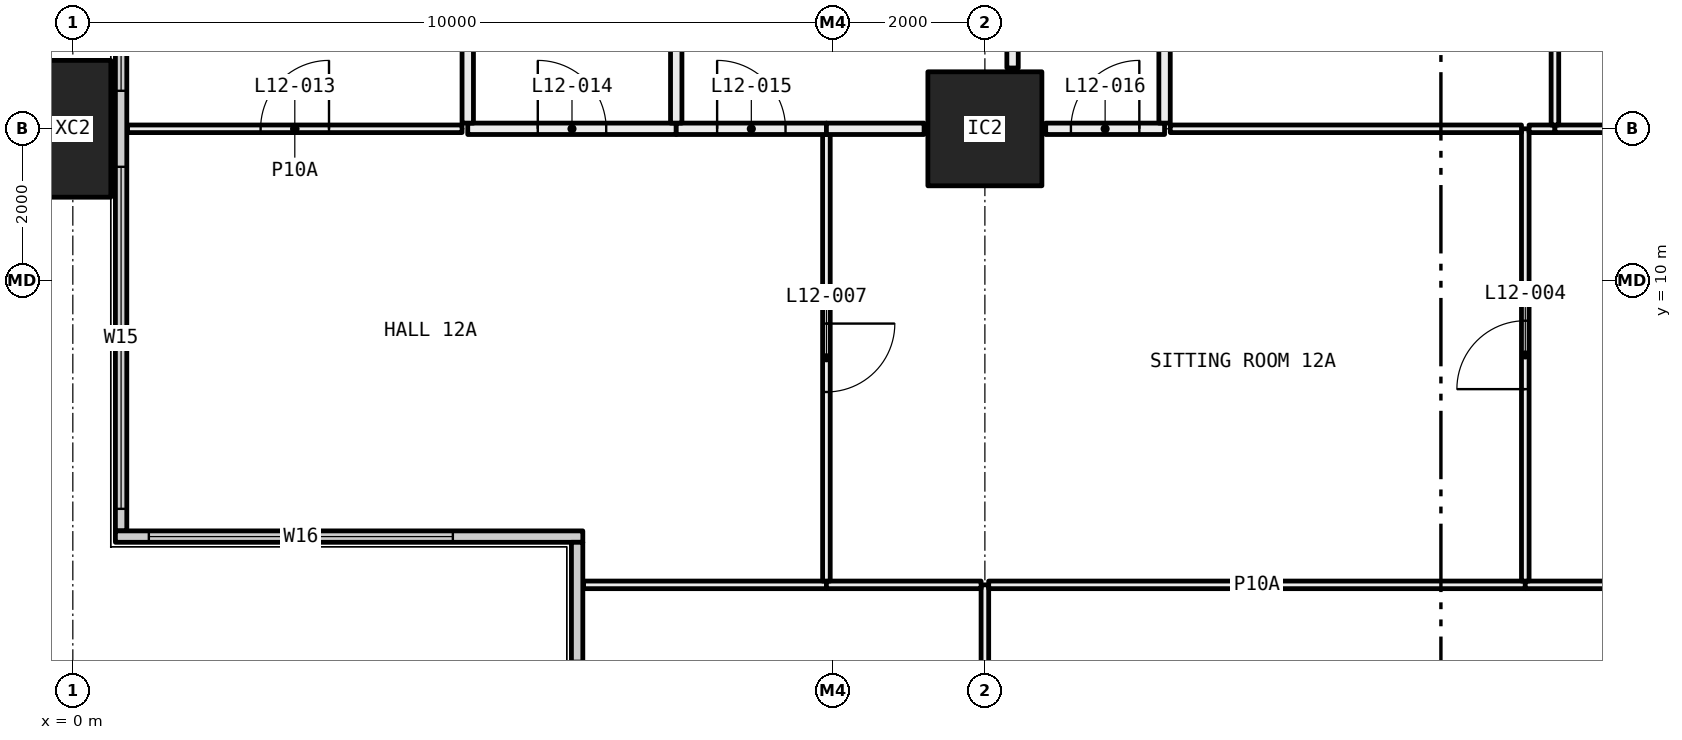
"""IFC4 building model, lengths in metres.
Left out: names, types, materials, properties, quantities, classifications, styles, units other than length and angle.
Written with IfcOpenShell. Run it as: python <this file> out.ifc"""

import sys

from ifc_helpers import new_model, si_unit, direction, frame, frame_2d, origin, origin_2d, place, context, subcontext, project, spatial, rectangle, hollow_rectangle, extrude, element, fill, save


model = new_model("IFC4")
c1 = context("Model", 3, precision=1e-05, world=origin(), true_north=direction((0.0, 1.0)))
c2 = subcontext(c1, "Body", "Model", "MODEL_VIEW")
j1 = project(units=[si_unit("LENGTHUNIT", "METRE"), si_unit("PLANEANGLEUNIT", "RADIAN")], contexts=[c1])
p1 = place(None, origin())
s1 = spatial("IfcSite", under=j1, at=p1, CompositionType="ELEMENT")
p2 = place(p1, origin())
s2 = spatial("IfcBuilding", under=s1, at=p2, CompositionType="ELEMENT")
p3 = place(p2, frame((0.0, 0.0, 54.15)))
s3 = spatial("IfcBuildingStorey", under=s2, at=p3, CompositionType="ELEMENT", Elevation=54.15)
p4 = place(p3, frame((0.0, 12.0, -0.4), z_axis=(0.0, 0.0, 1.0), x_axis=(0.0, 1.0, 0.0)))
e1 = element("IfcColumn", 1, at=p4, inside=s3, PredefinedType="COLUMN", context=c2, shape_type="SweptSolid", body=[
    extrude(hollow_rectangle(XDim=1.8, YDim=1.0, WallThickness=0.07, at=origin_2d()), origin(), (0.0, 0.0, 1.0), 3.45),
])
p5 = place(p3, frame((12.0, 12.0, 0.0), z_axis=(0.0, 0.0, 1.0), x_axis=(1.0, 0.0, 0.0)))
e2 = element("IfcColumn", 2, at=p5, inside=s3, PredefinedType="COLUMN", context=c2, shape_type="SweptSolid", body=[
    extrude(hollow_rectangle(XDim=1.5, YDim=1.5, WallThickness=0.065, at=origin_2d()), origin(), (0.0, 0.0, 1.0), 3.05),
])
p6 = place(p3, frame((0.635, 6.71, 0.0), z_axis=(0.0, 0.0, 1.0), x_axis=(0.0, 1.0, 0.0)))
e3 = element("IfcWall", 3, at=p6, inside=s3, PredefinedType="ELEMENTEDWALL", context=c2, shape_type="SweptSolid", body=[
    extrude(rectangle(XDim=34.58, YDim=0.15, at=frame_2d((17.29, 0.0))), origin(), (0.0, 0.0, 1.0), 3.05),
])
p7 = place(p6, frame((0.29, 0.0, 0.45)))
e4 = element("IfcOpeningElement", 4, at=p7, cuts=e3, PredefinedType="OPENING", context=c2, shape_type="SweptSolid", body=[
    extrude(rectangle(XDim=4.5, YDim=2.55, at=frame_2d((2.25, 1.275))), frame((0.0, 0.085, 0.0), z_axis=(0.0, -1.0, 0.0), x_axis=(1.0, 0.0, 0.0)), (0.0, 0.0, 1.0), 0.17),
])
p8 = place(p6, frame((5.79, 0.0, 0.45)))
e5 = element("IfcOpeningElement", 5, at=p8, cuts=e3, PredefinedType="OPENING", context=c2, shape_type="SweptSolid", body=[
    extrude(rectangle(XDim=1.25, YDim=2.55, at=frame_2d((0.625, 1.275))), frame((0.0, 0.085, 0.0), z_axis=(0.0, -1.0, 0.0), x_axis=(1.0, 0.0, 0.0)), (0.0, 0.0, 1.0), 0.17),
])
p9 = place(p6, frame((9.79, 0.0, 0.45)))
e6 = element("IfcOpeningElement", 6, at=p9, cuts=e3, PredefinedType="OPENING", context=c2, shape_type="SweptSolid", body=[
    extrude(rectangle(XDim=1.0, YDim=2.55, at=frame_2d((0.5, 1.275))), frame((0.0, 0.085, 0.0), z_axis=(0.0, -1.0, 0.0), x_axis=(1.0, 0.0, 0.0)), (0.0, 0.0, 1.0), 0.17),
])
p10 = place(p6, frame((11.79, 0.0, 0.45)))
e7 = element("IfcOpeningElement", 7, at=p10, cuts=e3, PredefinedType="OPENING", context=c2, shape_type="SweptSolid", body=[
    extrude(rectangle(XDim=1.0, YDim=2.55, at=frame_2d((0.5, 1.275))), frame((0.0, 0.085, 0.0), z_axis=(0.0, -1.0, 0.0), x_axis=(1.0, 0.0, 0.0)), (0.0, 0.0, 1.0), 0.17),
])
p11 = place(p6, frame((15.54, 0.0, 0.45)))
e8 = element("IfcOpeningElement", 8, at=p11, cuts=e3, PredefinedType="OPENING", context=c2, shape_type="SweptSolid", body=[
    extrude(rectangle(XDim=1.25, YDim=2.55, at=frame_2d((0.625, 1.275))), frame((0.0, 0.085, 0.0), z_axis=(0.0, -1.0, 0.0), x_axis=(1.0, 0.0, 0.0)), (0.0, 0.0, 1.0), 0.17),
])
p12 = place(p6, frame((17.79, 0.0, 0.45)))
e9 = element("IfcOpeningElement", 9, at=p12, cuts=e3, PredefinedType="OPENING", context=c2, shape_type="SweptSolid", body=[
    extrude(rectangle(XDim=1.25, YDim=2.55, at=frame_2d((0.625, 1.275))), frame((0.0, 0.085, 0.0), z_axis=(0.0, -1.0, 0.0), x_axis=(1.0, 0.0, 0.0)), (0.0, 0.0, 1.0), 0.17),
])
p13 = place(p6, frame((21.79, 0.0, 0.45)))
e10 = element("IfcOpeningElement", 10, at=p13, cuts=e3, PredefinedType="OPENING", context=c2, shape_type="SweptSolid", body=[
    extrude(rectangle(XDim=1.0, YDim=2.55, at=frame_2d((0.5, 1.275))), frame((0.0, 0.085, 0.0), z_axis=(0.0, -1.0, 0.0), x_axis=(1.0, 0.0, 0.0)), (0.0, 0.0, 1.0), 0.17),
])
p14 = place(p6, frame((23.79, 0.0, 0.45)))
e11 = element("IfcOpeningElement", 11, at=p14, cuts=e3, PredefinedType="OPENING", context=c2, shape_type="SweptSolid", body=[
    extrude(rectangle(XDim=1.0, YDim=2.55, at=frame_2d((0.5, 1.275))), frame((0.0, 0.085, 0.0), z_axis=(0.0, -1.0, 0.0), x_axis=(1.0, 0.0, 0.0)), (0.0, 0.0, 1.0), 0.17),
])
p15 = place(p6, frame((27.54, 0.0, 0.45)))
e12 = element("IfcOpeningElement", 12, at=p15, cuts=e3, PredefinedType="OPENING", context=c2, shape_type="SweptSolid", body=[
    extrude(rectangle(XDim=1.25, YDim=2.55, at=frame_2d((0.625, 1.275))), frame((0.0, 0.085, 0.0), z_axis=(0.0, -1.0, 0.0), x_axis=(1.0, 0.0, 0.0)), (0.0, 0.0, 1.0), 0.17),
])
p16 = place(p6, frame((29.79, 0.0, 0.45)))
e13 = element("IfcOpeningElement", 13, at=p16, cuts=e3, PredefinedType="OPENING", context=c2, shape_type="SweptSolid", body=[
    extrude(rectangle(XDim=4.5, YDim=2.55, at=frame_2d((2.25, 1.275))), frame((0.0, 0.085, 0.0), z_axis=(0.0, -1.0, 0.0), x_axis=(1.0, 0.0, 0.0)), (0.0, 0.0, 1.0), 0.17),
])
p17 = place(p3, frame((0.56, 6.635, 0.0), z_axis=(0.0, 0.0, 1.0), x_axis=(1.0, 0.0, 0.0)))
e14 = element("IfcWall", 14, at=p17, inside=s3, PredefinedType="ELEMENTEDWALL", context=c2, shape_type="SweptSolid", body=[
    extrude(rectangle(XDim=6.15, YDim=0.15, at=frame_2d((3.075, 0.0))), origin(), (0.0, 0.0, 1.0), 3.05),
])
p18 = place(p17, frame((0.44, 0.0, 0.45)))
e15 = element("IfcOpeningElement", 15, at=p18, cuts=e14, PredefinedType="OPENING", context=c2, shape_type="SweptSolid", body=[
    extrude(rectangle(XDim=4.0, YDim=2.55, at=frame_2d((2.0, 1.275))), frame((0.0, 0.085, 0.0), z_axis=(0.0, -1.0, 0.0), x_axis=(1.0, 0.0, 0.0)), (0.0, 0.0, 1.0), 0.17),
])
p19 = place(p3, frame((6.635, 0.71, 0.0), z_axis=(0.0, 0.0, 1.0), x_axis=(0.0, 1.0, 0.0)))
e16 = element("IfcWall", 16, at=p19, inside=s3, PredefinedType="ELEMENTEDWALL", context=c2, shape_type="SweptSolid", body=[
    extrude(rectangle(XDim=5.85, YDim=0.15, at=frame_2d((2.925, 0.0))), origin(), (0.0, 0.0, 1.0), 3.05),
])
p20 = place(p19, frame((0.29, 0.0, 0.45)))
e17 = element("IfcOpeningElement", 17, at=p20, cuts=e16, PredefinedType="OPENING", context=c2, shape_type="SweptSolid", body=[
    extrude(rectangle(XDim=4.0, YDim=2.55, at=frame_2d((2.0, 1.275))), frame((0.0, 0.085, 0.0), z_axis=(0.0, -1.0, 0.0), x_axis=(1.0, 0.0, 0.0)), (0.0, 0.0, 1.0), 0.17),
])
p21 = place(p3, frame((12.0, 0.72, 0.0), z_axis=(0.0, 0.0, 1.0), x_axis=(0.0, 1.0, 0.0)))
e18 = element("IfcWall", 18, at=p21, inside=s3, PredefinedType="PARTITIONING", context=c2, shape_type="SweptSolid", body=[
    extrude(rectangle(XDim=5.28, YDim=0.1, at=frame_2d((2.64, 0.0))), origin(), (0.0, 0.0, 1.0), 2.45),
])
p22 = place(p21, frame((2.19, 0.0, 0.0)))
e19 = element("IfcOpeningElement", 19, at=p22, cuts=e18, PredefinedType="OPENING", context=c2, shape_type="SweptSolid", body=[
    extrude(rectangle(XDim=0.9, YDim=2.1, at=frame_2d((0.45, 1.05))), frame((0.0, 0.06, 0.0), z_axis=(0.0, -1.0, 0.0), x_axis=(1.0, 0.0, 0.0)), (0.0, 0.0, 1.0), 0.12),
])
p23 = place(p3, frame((9.915, 6.0, 0.0), z_axis=(0.0, 0.0, 1.0), x_axis=(-1.0, 0.0, 0.0)))
e20 = element("IfcWall", 20, at=p23, inside=s3, PredefinedType="PARTITIONING", context=c2, shape_type="SweptSolid", body=[
    extrude(rectangle(XDim=3.195, YDim=0.1, at=frame_2d((1.598, 0.0))), origin(), (0.0, 0.0, 1.0), 3.05),
])
p24 = place(p3, frame((11.95, 6.0, 0.0), z_axis=(0.0, 0.0, 1.0), x_axis=(-1.0, 0.0, 0.0)))
e21 = element("IfcWall", 21, at=p24, inside=s3, PredefinedType="PARTITIONING", context=c2, shape_type="SweptSolid", body=[
    extrude(rectangle(XDim=2.035, YDim=0.1, at=frame_2d((1.018, 0.0))), origin(), (0.0, 0.0, 1.0), 2.45),
])
p25 = place(p3, frame((19.11, 6.0, 0.0), z_axis=(0.0, 0.0, 1.0), x_axis=(-1.0, 0.0, 0.0)))
e22 = element("IfcWall", 22, at=p25, inside=s3, PredefinedType="PARTITIONING", context=c2, shape_type="SweptSolid", body=[
    extrude(rectangle(XDim=7.06, YDim=0.1, at=frame_2d((3.53, 0.0))), origin(), (0.0, 0.0, 1.0), 2.45),
])
p26 = place(p3, frame((23.95, 6.0, 0.0), z_axis=(0.0, 0.0, 1.0), x_axis=(-1.0, 0.0, 0.0)))
e23 = element("IfcWall", 23, at=p26, inside=s3, PredefinedType="PARTITIONING", context=c2, shape_type="SweptSolid", body=[
    extrude(rectangle(XDim=4.84, YDim=0.1, at=frame_2d((2.42, 0.0))), origin(), (0.0, 0.0, 1.0), 2.45),
])
p27 = place(p26, frame((1.97, 0.0, 0.0)))
e24 = element("IfcOpeningElement", 24, at=p27, cuts=e23, PredefinedType="OPENING", context=c2, shape_type="SweptSolid", body=[
    extrude(rectangle(XDim=0.9, YDim=2.1, at=frame_2d((0.45, 1.05))), frame((0.0, 0.06, 0.0), z_axis=(0.0, -1.0, 0.0), x_axis=(1.0, 0.0, 0.0)), (0.0, 0.0, 1.0), 0.12),
])
p28 = place(p3, frame((9.915, 6.05, 0.0), z_axis=(0.0, 0.0, 1.0), x_axis=(0.0, 1.0, 0.0)))
e25 = element("IfcWall", 25, at=p28, inside=s3, PredefinedType="PARTITIONING", context=c2, shape_type="SweptSolid", body=[
    extrude(rectangle(XDim=5.875, YDim=0.1, at=frame_2d((2.938, 0.0))), origin(), (0.0, 0.0, 1.0), 2.45),
])
p29 = place(p28, frame((2.488, 0.0, 0.0)))
e26 = element("IfcOpeningElement", 26, at=p29, cuts=e25, PredefinedType="OPENING", context=c2, shape_type="SweptSolid", body=[
    extrude(rectangle(XDim=0.9, YDim=2.1, at=frame_2d((0.45, 1.05))), frame((0.0, 0.06, 0.0), z_axis=(0.0, -1.0, 0.0), x_axis=(1.0, 0.0, 0.0)), (0.0, 0.0, 1.0), 0.12),
])
p30 = place(p3, frame((5.121, 12.0, 0.0), z_axis=(0.0, 0.0, 1.0), x_axis=(-1.0, 0.0, 0.0)))
e27 = element("IfcWall", 27, at=p30, inside=s3, PredefinedType="PARTITIONING", context=c2, shape_type="SweptSolid", body=[
    extrude(rectangle(XDim=4.401, YDim=0.1, at=frame_2d((2.201, 0.0))), origin(), (0.0, 0.0, 1.0), 2.45),
])
p31 = place(p30, frame((1.75, 0.0, 0.0)))
e28 = element("IfcOpeningElement", 28, at=p31, cuts=e27, PredefinedType="OPENING", context=c2, shape_type="SweptSolid", body=[
    extrude(rectangle(XDim=0.9, YDim=2.1, at=frame_2d((0.45, 1.05))), frame((0.0, 0.06, 0.0), z_axis=(0.0, -1.0, 0.0), x_axis=(1.0, 0.0, 0.0)), (0.0, 0.0, 1.0), 0.12),
])
p32 = place(p3, frame((7.939, 12.0, 0.0), z_axis=(0.0, 0.0, 1.0), x_axis=(-1.0, 0.0, 0.0)))
e29 = element("IfcWall", 29, at=p32, inside=s3, PredefinedType="PARTITIONING", context=c2, shape_type="SweptSolid", body=[
    extrude(rectangle(XDim=2.743, YDim=0.15, at=frame_2d((1.372, 0.0))), origin(), (0.0, 0.0, 1.0), 2.45),
])
p33 = place(p32, frame((0.921, 0.0, 0.0)))
e30 = element("IfcOpeningElement", 30, at=p33, cuts=e29, PredefinedType="OPENING", context=c2, shape_type="SweptSolid", body=[
    extrude(rectangle(XDim=0.9, YDim=2.1, at=frame_2d((0.45, 1.05))), frame((0.0, 0.085, 0.0), z_axis=(0.0, -1.0, 0.0), x_axis=(1.0, 0.0, 0.0)), (0.0, 0.0, 1.0), 0.17),
])
p34 = place(p3, frame((9.915, 12.0, 0.0), z_axis=(0.0, 0.0, 1.0), x_axis=(-1.0, 0.0, 0.0)))
e31 = element("IfcWall", 31, at=p34, inside=s3, PredefinedType="PARTITIONING", context=c2, shape_type="SweptSolid", body=[
    extrude(rectangle(XDim=1.976, YDim=0.15, at=frame_2d((0.988, 0.0))), origin(), (0.0, 0.0, 1.0), 2.45),
])
p35 = place(p34, frame((0.538, 0.0, 0.0)))
e32 = element("IfcOpeningElement", 32, at=p35, cuts=e31, PredefinedType="OPENING", context=c2, shape_type="SweptSolid", body=[
    extrude(rectangle(XDim=0.9, YDim=2.1, at=frame_2d((0.45, 1.05))), frame((0.0, 0.085, 0.0), z_axis=(0.0, -1.0, 0.0), x_axis=(1.0, 0.0, 0.0)), (0.0, 0.0, 1.0), 0.17),
])
p36 = place(p3, frame((19.11, 6.05, 0.0), z_axis=(0.0, 0.0, 1.0), x_axis=(0.0, 1.0, 0.0)))
e33 = element("IfcWall", 33, at=p36, inside=s3, PredefinedType="PARTITIONING", context=c2, shape_type="SweptSolid", body=[
    extrude(rectangle(XDim=5.95, YDim=0.1, at=frame_2d((2.975, 0.0))), origin(), (0.0, 0.0, 1.0), 2.45),
])
p37 = place(p36, frame((2.525, 0.0, 0.0)))
e34 = element("IfcOpeningElement", 34, at=p37, cuts=e33, PredefinedType="OPENING", context=c2, shape_type="SweptSolid", body=[
    extrude(rectangle(XDim=0.9, YDim=2.1, at=frame_2d((0.45, 1.05))), frame((0.0, 0.06, 0.0), z_axis=(0.0, -1.0, 0.0), x_axis=(1.0, 0.0, 0.0)), (0.0, 0.0, 1.0), 0.12),
])
p38 = place(p3, frame((11.2, 12.0, 0.0), z_axis=(0.0, 0.0, 1.0), x_axis=(-1.0, 0.0, 0.0)))
e35 = element("IfcWall", 35, at=p38, inside=s3, PredefinedType="PARTITIONING", context=c2, shape_type="SweptSolid", body=[
    extrude(rectangle(XDim=1.285, YDim=0.15, at=frame_2d((0.643, 0.0))), origin(), (0.0, 0.0, 1.0), 2.45),
])
p39 = place(p3, frame((14.364, 12.0, 0.0), z_axis=(0.0, 0.0, 1.0), x_axis=(-1.0, 0.0, 0.0)))
e36 = element("IfcWall", 36, at=p39, inside=s3, PredefinedType="PARTITIONING", context=c2, shape_type="SweptSolid", body=[
    extrude(rectangle(XDim=1.564, YDim=0.15, at=frame_2d((0.782, 0.0))), origin(), (0.0, 0.0, 1.0), 2.45),
])
p40 = place(p39, frame((0.332, 0.0, 0.0)))
e37 = element("IfcOpeningElement", 37, at=p40, cuts=e36, PredefinedType="OPENING", context=c2, shape_type="SweptSolid", body=[
    extrude(rectangle(XDim=0.9, YDim=2.1, at=frame_2d((0.45, 1.05))), frame((0.0, 0.085, 0.0), z_axis=(0.0, -1.0, 0.0), x_axis=(1.0, 0.0, 0.0)), (0.0, 0.0, 1.0), 0.17),
])
p41 = place(p3, frame((19.06, 12.0, 0.0), z_axis=(0.0, 0.0, 1.0), x_axis=(-1.0, 0.0, 0.0)))
e38 = element("IfcWall", 38, at=p41, inside=s3, PredefinedType="PARTITIONING", context=c2, shape_type="SweptSolid", body=[
    extrude(rectangle(XDim=4.621, YDim=0.1, at=frame_2d((2.311, 0.0))), origin(), (0.0, 0.0, 1.0), 2.45),
])
p42 = place(p3, frame((19.5, 12.0, 0.0), z_axis=(0.0, 0.0, 1.0), x_axis=(-1.0, 0.0, 0.0)))
e39 = element("IfcWall", 39, at=p42, inside=s3, PredefinedType="PARTITIONING", context=c2, shape_type="SweptSolid", body=[
    extrude(rectangle(XDim=0.34, YDim=0.1, at=frame_2d((0.17, 0.0))), origin(), (0.0, 0.0, 1.0), 2.45),
])
p43 = place(p3, frame((23.2, 12.0, 0.0), z_axis=(0.0, 0.0, 1.0), x_axis=(-1.0, 0.0, 0.0)))
e40 = element("IfcWall", 40, at=p43, inside=s3, PredefinedType="PARTITIONING", context=c2, shape_type="SweptSolid", body=[
    extrude(rectangle(XDim=3.7, YDim=0.1, at=frame_2d((1.85, 0.0))), origin(), (0.0, 0.0, 1.0), 2.45),
])
p44 = place(p43, frame((1.4, 0.0, 0.0)))
e41 = element("IfcOpeningElement", 41, at=p44, cuts=e40, PredefinedType="OPENING", context=c2, shape_type="SweptSolid", body=[
    extrude(rectangle(XDim=0.9, YDim=2.1, at=frame_2d((0.45, 1.05))), frame((0.0, 0.06, 0.0), z_axis=(0.0, -1.0, 0.0), x_axis=(1.0, 0.0, 0.0)), (0.0, 0.0, 1.0), 0.12),
])
p45 = place(p3, frame((5.196, 12.075, 0.0), z_axis=(0.0, 0.0, 1.0), x_axis=(0.0, 1.0, 0.0)))
e42 = element("IfcWall", 42, at=p45, inside=s3, PredefinedType="PARTITIONING", context=c2, shape_type="SweptSolid", body=[
    extrude(rectangle(XDim=5.825, YDim=0.15, at=frame_2d((2.913, 0.0))), origin(), (0.0, 0.0, 1.0), 2.45),
])
p46 = place(p3, frame((7.939, 12.075, 0.0), z_axis=(0.0, 0.0, 1.0), x_axis=(0.0, 1.0, 0.0)))
e43 = element("IfcWall", 43, at=p46, inside=s3, PredefinedType="PARTITIONING", context=c2, shape_type="SweptSolid", body=[
    extrude(rectangle(XDim=2.637, YDim=0.15, at=frame_2d((1.318, 0.0))), origin(), (0.0, 0.0, 1.0), 2.45),
])
p47 = place(p3, frame((12.364, 12.8, 0.0), z_axis=(0.0, 0.0, 1.0), x_axis=(0.0, 1.0, 0.0)))
e44 = element("IfcWall", 44, at=p47, inside=s3, PredefinedType="PARTITIONING", context=c2, shape_type="SweptSolid", body=[
    extrude(rectangle(XDim=1.837, YDim=0.15, at=frame_2d((0.918, 0.0))), origin(), (0.0, 0.0, 1.0), 3.05),
])
p48 = place(p3, frame((14.364, 12.075, 0.0), z_axis=(0.0, 0.0, 1.0), x_axis=(0.0, 1.0, 0.0)))
e45 = element("IfcWall", 45, at=p48, inside=s3, PredefinedType="PARTITIONING", context=c2, shape_type="SweptSolid", body=[
    extrude(rectangle(XDim=5.825, YDim=0.15, at=frame_2d((2.913, 0.0))), origin(), (0.0, 0.0, 1.0), 2.45),
])
p49 = place(p3, frame((19.5, 12.05, 0.0), z_axis=(0.0, 0.0, 1.0), x_axis=(0.0, 1.0, 0.0)))
e46 = element("IfcWall", 46, at=p49, inside=s3, PredefinedType="PARTITIONING", context=c2, shape_type="SweptSolid", body=[
    extrude(rectangle(XDim=5.85, YDim=0.1, at=frame_2d((2.925, 0.0))), origin(), (0.0, 0.0, 1.0), 2.45),
])
p50 = place(p49, frame((2.475, 0.0, 0.0)))
e47 = element("IfcOpeningElement", 47, at=p50, cuts=e46, PredefinedType="OPENING", context=c2, shape_type="SweptSolid", body=[
    extrude(rectangle(XDim=0.9, YDim=2.1, at=frame_2d((0.45, 1.05))), frame((0.0, 0.06, 0.0), z_axis=(0.0, -1.0, 0.0), x_axis=(1.0, 0.0, 0.0)), (0.0, 0.0, 1.0), 0.12),
])
p51 = place(p7, origin())
e48 = element("IfcWindow", 48, at=p51, inside=s3, PartitioningType="SINGLE_PANEL", PredefinedType="WINDOW", context=c2, shape_type="SweptSolid", body=[
    extrude(rectangle(XDim=4.5, YDim=2.55, at=frame_2d((2.25, 1.275))), frame((0.0, 0.03, 0.0), z_axis=(0.0, -1.0, 0.0), x_axis=(1.0, 0.0, 0.0)), (0.0, 0.0, 1.0), 0.06),
])
fill(e4, e48)
p52 = place(p8, origin())
e49 = element("IfcWindow", 49, at=p52, inside=s3, PartitioningType="SINGLE_PANEL", PredefinedType="WINDOW", context=c2, shape_type="SweptSolid", body=[
    extrude(rectangle(XDim=1.25, YDim=2.55, at=frame_2d((0.625, 1.275))), frame((0.0, 0.03, 0.0), z_axis=(0.0, -1.0, 0.0), x_axis=(1.0, 0.0, 0.0)), (0.0, 0.0, 1.0), 0.06),
])
fill(e5, e49)
p53 = place(p18, origin())
e50 = element("IfcWindow", 50, at=p53, inside=s3, PartitioningType="SINGLE_PANEL", PredefinedType="WINDOW", context=c2, shape_type="SweptSolid", body=[
    extrude(rectangle(XDim=4.0, YDim=2.55, at=frame_2d((2.0, 1.275))), frame((0.0, 0.03, 0.0), z_axis=(0.0, -1.0, 0.0), x_axis=(1.0, 0.0, 0.0)), (0.0, 0.0, 1.0), 0.06),
])
fill(e15, e50)
p54 = place(p37, origin())
e51 = element("IfcDoor", 51, at=p54, inside=s3, OperationType="SINGLE_SWING_RIGHT", PredefinedType="DOOR", context=c2, shape_type="SweptSolid", body=[
    extrude(rectangle(XDim=0.9, YDim=2.1, at=frame_2d((0.45, 1.05))), frame((0.0, 0.025, 0.0), z_axis=(0.0, -1.0, 0.0), x_axis=(1.0, 0.0, 0.0)), (0.0, 0.0, 1.0), 0.05),
])
fill(e34, e51)
p55 = place(p29, frame((0.9, 0.0, 0.0), x_axis=(-1.0, 0.0, 0.0)))
e52 = element("IfcDoor", 52, at=p55, inside=s3, OperationType="SINGLE_SWING_RIGHT", PredefinedType="DOOR", context=c2, shape_type="SweptSolid", body=[
    extrude(rectangle(XDim=0.9, YDim=2.1, at=frame_2d((0.45, 1.05))), frame((0.0, 0.025, 0.0), z_axis=(0.0, -1.0, 0.0), x_axis=(1.0, 0.0, 0.0)), (0.0, 0.0, 1.0), 0.05),
])
fill(e26, e52)
p56 = place(p31, frame((0.9, 0.0, 0.0), x_axis=(-1.0, 0.0, 0.0)))
e53 = element("IfcDoor", 53, at=p56, inside=s3, OperationType="SINGLE_SWING_LEFT", PredefinedType="DOOR", context=c2, shape_type="SweptSolid", body=[
    extrude(rectangle(XDim=0.9, YDim=2.1, at=frame_2d((0.45, 1.05))), frame((0.0, 0.025, 0.0), z_axis=(0.0, -1.0, 0.0), x_axis=(1.0, 0.0, 0.0)), (0.0, 0.0, 1.0), 0.05),
])
fill(e28, e53)
p57 = place(p33, frame((0.9, 0.0, 0.0), x_axis=(-1.0, 0.0, 0.0)))
e54 = element("IfcDoor", 54, at=p57, inside=s3, OperationType="SINGLE_SWING_RIGHT", PredefinedType="DOOR", context=c2, shape_type="SweptSolid", body=[
    extrude(rectangle(XDim=0.9, YDim=2.1, at=frame_2d((0.45, 1.05))), frame((0.0, 0.025, 0.0), z_axis=(0.0, -1.0, 0.0), x_axis=(1.0, 0.0, 0.0)), (0.0, 0.0, 1.0), 0.05),
])
fill(e30, e54)
p58 = place(p35, frame((0.9, 0.0, 0.0), x_axis=(-1.0, 0.0, 0.0)))
e55 = element("IfcDoor", 55, at=p58, inside=s3, OperationType="SINGLE_SWING_RIGHT", PredefinedType="DOOR", context=c2, shape_type="SweptSolid", body=[
    extrude(rectangle(XDim=0.9, YDim=2.1, at=frame_2d((0.45, 1.05))), frame((0.0, 0.025, 0.0), z_axis=(0.0, -1.0, 0.0), x_axis=(1.0, 0.0, 0.0)), (0.0, 0.0, 1.0), 0.05),
])
fill(e32, e55)
p59 = place(p40, frame((0.9, 0.0, 0.0), x_axis=(-1.0, 0.0, 0.0)))
e56 = element("IfcDoor", 56, at=p59, inside=s3, OperationType="SINGLE_SWING_LEFT", PredefinedType="DOOR", context=c2, shape_type="SweptSolid", body=[
    extrude(rectangle(XDim=0.9, YDim=2.1, at=frame_2d((0.45, 1.05))), frame((0.0, 0.025, 0.0), z_axis=(0.0, -1.0, 0.0), x_axis=(1.0, 0.0, 0.0)), (0.0, 0.0, 1.0), 0.05),
])
fill(e37, e56)
save(model, sys.argv[1])
